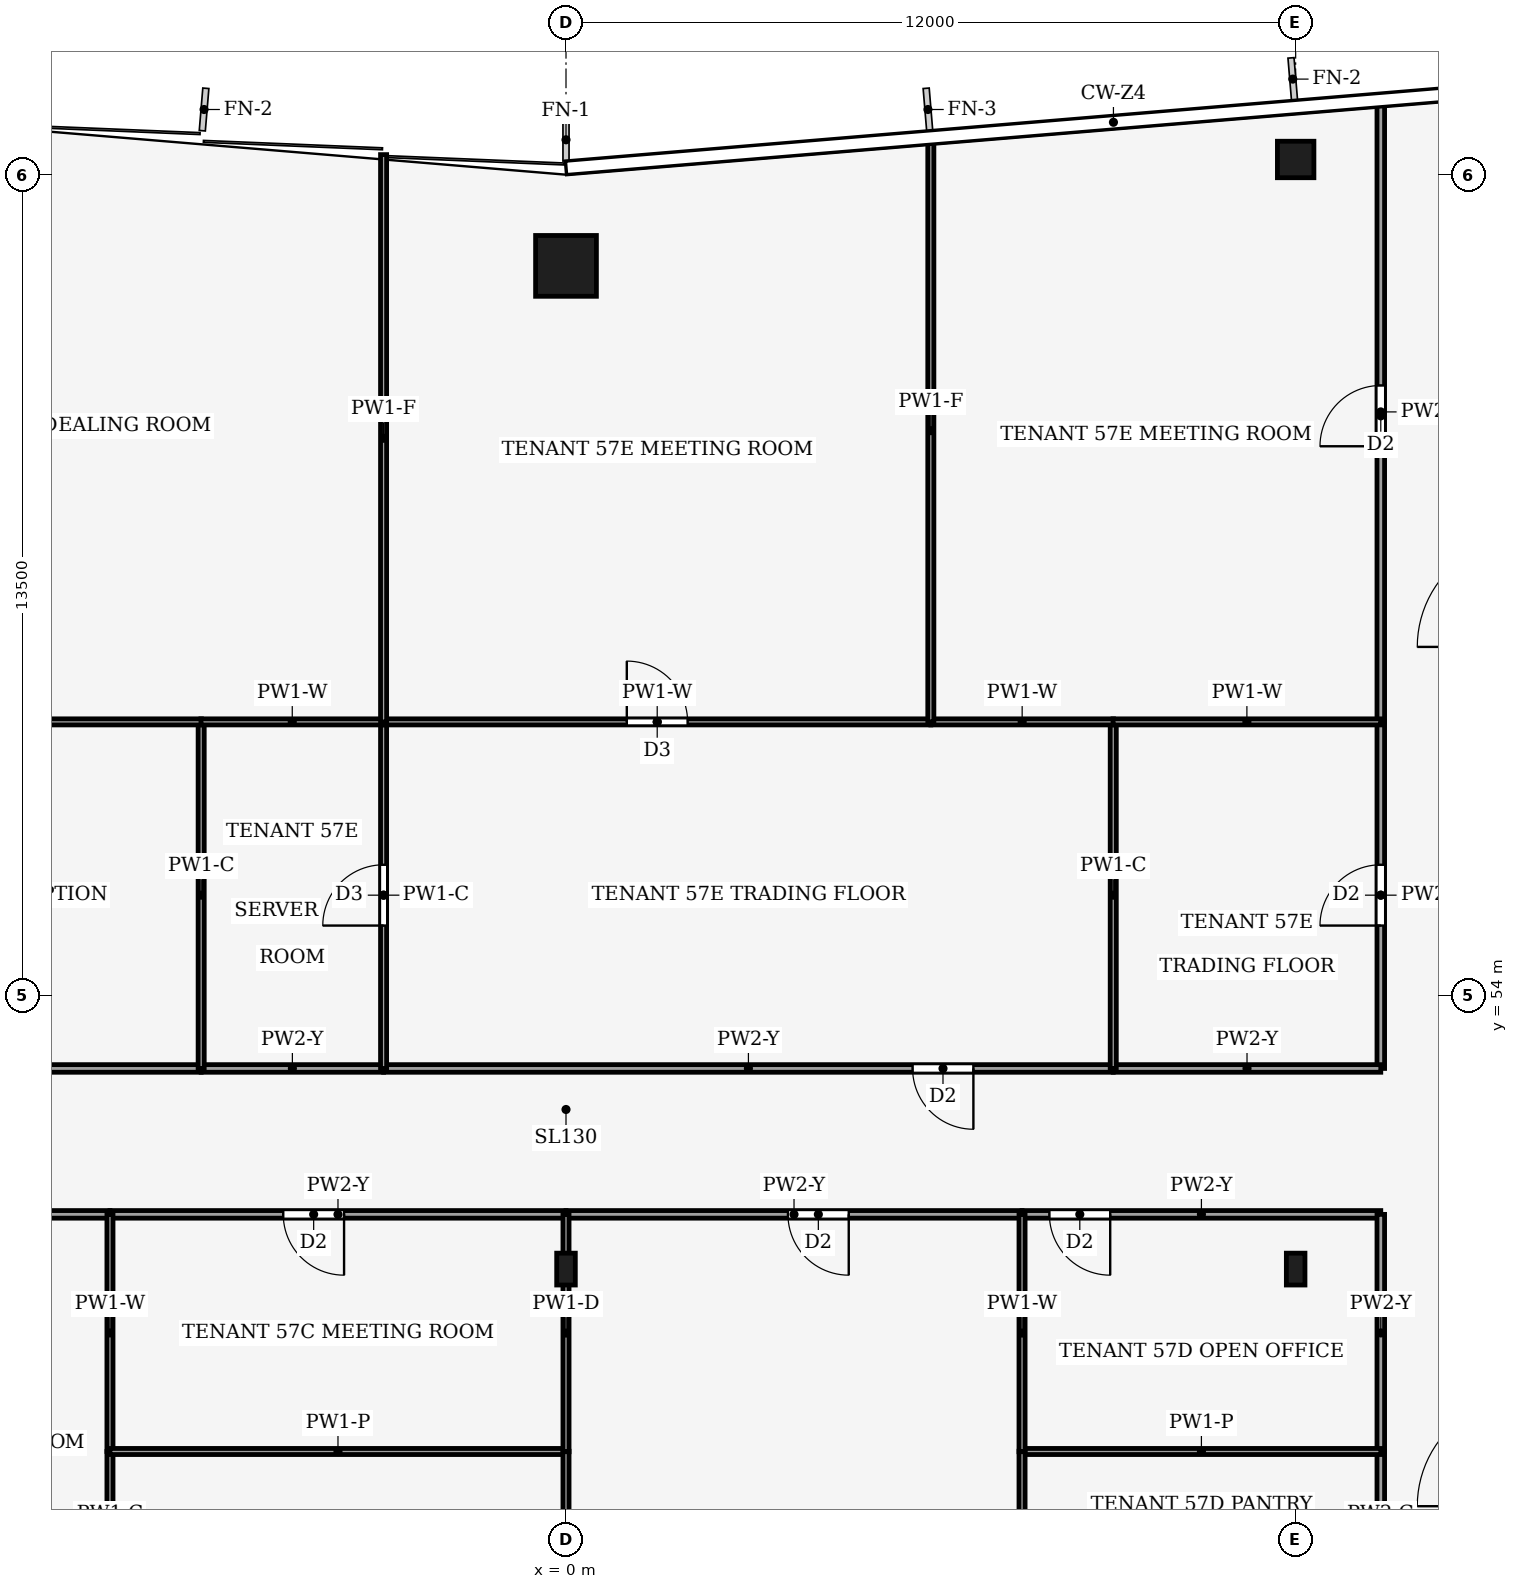
"""IFC4 building model, lengths in metres.
Left out: names, types, materials, properties, quantities, classifications, styles, units other than length and angle.
Written with IfcOpenShell. Run it as: python <this file> out.ifc"""

import sys

from ifc_helpers import new_model, si_unit, direction, frame, frame_2d, origin, origin_2d, place, context, subcontext, project, spatial, rectangle, hollow_rectangle, i_section, extrude, element, fill, save


model = new_model("IFC4")
c1 = context("Model", 3, precision=1e-05, world=origin(), true_north=direction((0.0, 1.0)))
c2 = subcontext(c1, "Body", "Model", "MODEL_VIEW")
j1 = project(units=[si_unit("LENGTHUNIT", "METRE"), si_unit("PLANEANGLEUNIT", "RADIAN")], contexts=[c1])
p1 = place(None, origin())
s1 = spatial("IfcSite", under=j1, at=p1, CompositionType="ELEMENT")
p2 = place(p1, origin())
s2 = spatial("IfcBuilding", under=s1, at=p2, CompositionType="ELEMENT")
p3 = place(p2, frame((0.0, 0.0, 250.0)))
s3 = spatial("IfcBuildingStorey", under=s2, at=p3, CompositionType="ELEMENT", Elevation=250.0)
p4 = place(p3, frame((0.0, 66.0, 0.0), z_axis=(0.0, 0.0, 1.0), x_axis=(1.0, 0.0, 0.0)))
e1 = element("IfcColumn", 1, at=p4, inside=s3, PredefinedType="COLUMN", context=c2, shape_type="SweptSolid", body=[
    extrude(hollow_rectangle(XDim=1.0, YDim=1.0, WallThickness=0.045, at=origin_2d()), origin(), (0.0, 0.0, 1.0), 4.0),
])
p5 = place(p3, frame((12.0, 67.75, 0.0), z_axis=(0.0, 0.0, 1.0), x_axis=(1.0, 0.0, 0.0)))
e2 = element("IfcColumn", 2, at=p5, inside=s3, PredefinedType="COLUMN", context=c2, shape_type="SweptSolid", body=[
    extrude(hollow_rectangle(XDim=0.6, YDim=0.6, WallThickness=0.025, at=origin_2d()), origin(), (0.0, 0.0, 1.0), 4.0),
])
for number, where, z_axis, x_axis in (
    (3, (0.0, 49.5, 0.0), (0.0, 0.0, 1.0), (1.0, 0.0, 0.0)),
    (4, (12.0, 49.5, 0.0), (0.0, 0.0, 1.0), (1.0, 0.0, 0.0)),
):
    element("IfcColumn", number, at=place(p3, frame(where, z_axis=z_axis, x_axis=x_axis)), inside=s3, PredefinedType="COLUMN", context=c2, shape_type="SweptSolid", body=[
        extrude(i_section(OverallWidth=0.306, OverallDepth=0.524, WebThickness=0.012, FlangeThickness=0.04, FilletRadius=0.027, at=origin_2d()), origin(), (0.0, 0.0, 1.0), 4.0),
    ])
p6 = place(p3, frame((-7.5, 50.4, 0.0), z_axis=(0.0, 0.0, 1.0), x_axis=(-1.0, 0.0, 0.0)))
e5 = element("IfcWall", 5, at=p6, inside=s3, PredefinedType="PARTITIONING", context=c2, shape_type="SweptSolid", body=[
    extrude(rectangle(XDim=5.9, YDim=0.125, at=frame_2d((2.95, 0.0))), origin(), (0.0, 0.0, 1.0), 3.24),
])
p7 = place(p3, frame((0.0, 50.4, 0.0), z_axis=(0.0, 0.0, 1.0), x_axis=(-1.0, 0.0, 0.0)))
e6 = element("IfcWall", 6, at=p7, inside=s3, PredefinedType="PARTITIONING", context=c2, shape_type="SweptSolid", body=[
    extrude(rectangle(XDim=7.5, YDim=0.125, at=frame_2d((3.75, 0.0))), origin(), (0.0, 0.0, 1.0), 3.24),
])
p8 = place(p7, frame((3.65, 0.0, 0.0)))
e7 = element("IfcOpeningElement", 7, at=p8, cuts=e6, PredefinedType="OPENING", context=c2, shape_type="SweptSolid", body=[
    extrude(rectangle(XDim=1.0, YDim=2.1, at=frame_2d((0.5, 1.05))), frame((0.0, 0.073, 0.0), z_axis=(0.0, -1.0, 0.0), x_axis=(1.0, 0.0, 0.0)), (0.0, 0.0, 1.0), 0.145),
])
p9 = place(p3, frame((13.4, 43.5, 0.0), z_axis=(0.0, 0.0, 1.0), x_axis=(0.0, 1.0, 0.0)))
e8 = element("IfcWall", 8, at=p9, inside=s3, PredefinedType="PARTITIONING", context=c2, shape_type="SweptSolid", body=[
    extrude(rectangle(XDim=3.0, YDim=0.125, at=frame_2d((1.5, 0.0))), origin(), (0.0, 0.0, 1.0), 3.87),
])
p10 = place(p3, frame((13.4, 50.4, 0.0), z_axis=(0.0, 0.0, 1.0), x_axis=(-1.0, 0.0, 0.0)))
e9 = element("IfcWall", 9, at=p10, inside=s3, PredefinedType="PARTITIONING", context=c2, shape_type="SweptSolid", body=[
    extrude(rectangle(XDim=5.9, YDim=0.125, at=frame_2d((2.95, 0.0))), origin(), (0.0, 0.0, 1.0), 3.24),
])
p11 = place(p10, frame((4.45, 0.0, 0.0)))
e10 = element("IfcOpeningElement", 10, at=p11, cuts=e9, PredefinedType="OPENING", context=c2, shape_type="SweptSolid", body=[
    extrude(rectangle(XDim=1.0, YDim=2.1, at=frame_2d((0.5, 1.05))), frame((0.0, 0.073, 0.0), z_axis=(0.0, -1.0, 0.0), x_axis=(1.0, 0.0, 0.0)), (0.0, 0.0, 1.0), 0.145),
])
p12 = place(p3, frame((13.4, 46.5, 0.0), z_axis=(0.0, 0.0, 1.0), x_axis=(0.0, 1.0, 0.0)))
e11 = element("IfcWall", 11, at=p12, inside=s3, PredefinedType="PARTITIONING", context=c2, shape_type="SweptSolid", body=[
    extrude(rectangle(XDim=3.9, YDim=0.125, at=frame_2d((1.95, 0.0))), origin(), (0.0, 0.0, 1.0), 3.24),
])
p13 = place(p3, frame((7.5, 50.4, 0.0), z_axis=(0.0, 0.0, 1.0), x_axis=(-1.0, 0.0, 0.0)))
e12 = element("IfcWall", 12, at=p13, inside=s3, PredefinedType="PARTITIONING", context=c2, shape_type="SweptSolid", body=[
    extrude(rectangle(XDim=7.5, YDim=0.125, at=frame_2d((3.75, 0.0))), origin(), (0.0, 0.0, 1.0), 3.24),
])
p14 = place(p13, frame((2.85, 0.0, 0.0)))
e13 = element("IfcOpeningElement", 13, at=p14, cuts=e12, PredefinedType="OPENING", context=c2, shape_type="SweptSolid", body=[
    extrude(rectangle(XDim=1.0, YDim=2.1, at=frame_2d((0.5, 1.05))), frame((0.0, 0.073, 0.0), z_axis=(0.0, -1.0, 0.0), x_axis=(1.0, 0.0, 0.0)), (0.0, 0.0, 1.0), 0.145),
])
p15 = place(p3, frame((-13.4, 52.8, 0.0), z_axis=(0.0, 0.0, 1.0), x_axis=(1.0, 0.0, 0.0)))
e14 = element("IfcWall", 14, at=p15, inside=s3, PredefinedType="PARTITIONING", context=c2, shape_type="SweptSolid", body=[
    extrude(rectangle(XDim=7.4, YDim=0.125, at=frame_2d((3.7, 0.0))), origin(), (0.0, 0.0, 1.0), 3.24),
])
p16 = place(p15, frame((3.2, 0.0, 0.0)))
e15 = element("IfcOpeningElement", 15, at=p16, cuts=e14, PredefinedType="OPENING", context=c2, shape_type="SweptSolid", body=[
    extrude(rectangle(XDim=1.0, YDim=2.1, at=frame_2d((0.5, 1.05))), frame((0.0, 0.073, 0.0), z_axis=(0.0, -1.0, 0.0), x_axis=(1.0, 0.0, 0.0)), (0.0, 0.0, 1.0), 0.145),
])
p17 = place(p3, frame((-3.0, 52.8, 0.0), z_axis=(0.0, 0.0, 1.0), x_axis=(-1.0, 0.0, 0.0)))
e16 = element("IfcWall", 16, at=p17, inside=s3, PredefinedType="PARTITIONING", context=c2, shape_type="SweptSolid", body=[
    extrude(rectangle(XDim=3.0, YDim=0.125, at=frame_2d((1.5, 0.0))), origin(), (0.0, 0.0, 1.0), 3.24),
])
p18 = place(p3, frame((9.0, 52.8, 0.0), z_axis=(0.0, 0.0, 1.0), x_axis=(-1.0, 0.0, 0.0)))
e17 = element("IfcWall", 17, at=p18, inside=s3, PredefinedType="PARTITIONING", context=c2, shape_type="SweptSolid", body=[
    extrude(rectangle(XDim=12.0, YDim=0.125, at=frame_2d((6.0, 0.0))), origin(), (0.0, 0.0, 1.0), 3.24),
])
p19 = place(p18, frame((2.3, 0.0, 0.0)))
e18 = element("IfcOpeningElement", 18, at=p19, cuts=e17, PredefinedType="OPENING", context=c2, shape_type="SweptSolid", body=[
    extrude(rectangle(XDim=1.0, YDim=2.1, at=frame_2d((0.5, 1.05))), frame((0.0, 0.073, 0.0), z_axis=(0.0, -1.0, 0.0), x_axis=(1.0, 0.0, 0.0)), (0.0, 0.0, 1.0), 0.145),
])
p20 = place(p3, frame((13.4, 52.8, 0.0), z_axis=(0.0, 0.0, 1.0), x_axis=(0.0, 1.0, 0.0)))
e19 = element("IfcWall", 19, at=p20, inside=s3, PredefinedType="PARTITIONING", context=c2, shape_type="SweptSolid", body=[
    extrude(rectangle(XDim=5.7, YDim=0.125, at=frame_2d((2.85, 0.0))), origin(), (0.0, 0.0, 1.0), 3.87),
])
p21 = place(p20, frame((2.35, 0.0, 0.0)))
e20 = element("IfcOpeningElement", 20, at=p21, cuts=e19, PredefinedType="OPENING", context=c2, shape_type="SweptSolid", body=[
    extrude(rectangle(XDim=1.0, YDim=2.1, at=frame_2d((0.5, 1.05))), frame((0.0, 0.073, 0.0), z_axis=(0.0, -1.0, 0.0), x_axis=(1.0, 0.0, 0.0)), (0.0, 0.0, 1.0), 0.145),
])
p22 = place(p3, frame((13.4, 52.8, 0.0), z_axis=(0.0, 0.0, 1.0), x_axis=(-1.0, 0.0, 0.0)))
e21 = element("IfcWall", 21, at=p22, inside=s3, PredefinedType="PARTITIONING", context=c2, shape_type="SweptSolid", body=[
    extrude(rectangle(XDim=4.4, YDim=0.125, at=frame_2d((2.2, 0.0))), origin(), (0.0, 0.0, 1.0), 3.24),
])
p23 = place(p3, frame((13.4, 58.5, 0.0), z_axis=(0.0, 0.0, 1.0), x_axis=(0.0, 1.0, 0.0)))
e22 = element("IfcWall", 22, at=p23, inside=s3, PredefinedType="PARTITIONING", context=c2, shape_type="SweptSolid", body=[
    extrude(rectangle(XDim=10.197, YDim=0.125, at=frame_2d((5.098, 0.0))), origin(), (0.0, 0.0, 1.0), 3.04),
])
p24 = place(p23, frame((4.533, 0.0, 0.0)))
e23 = element("IfcOpeningElement", 23, at=p24, cuts=e22, PredefinedType="OPENING", context=c2, shape_type="SweptSolid", body=[
    extrude(rectangle(XDim=1.0, YDim=2.1, at=frame_2d((0.5, 1.05))), frame((0.0, 0.073, 0.0), z_axis=(0.0, -1.0, 0.0), x_axis=(1.0, 0.0, 0.0)), (0.0, 0.0, 1.0), 0.145),
])
p25 = place(p3, frame((-7.5, 43.496, 0.0), z_axis=(0.0, 0.0, 1.0), x_axis=(0.0, 1.0, 0.0)))
e24 = element("IfcWall", 24, at=p25, inside=s3, PredefinedType="PARTITIONING", context=c2, shape_type="SweptSolid", body=[
    extrude(rectangle(XDim=3.004, YDim=0.1, at=frame_2d((1.502, 0.0))), origin(), (0.0, 0.0, 1.0), 3.87),
])
p26 = place(p3, frame((-7.5, 46.5, 0.0), z_axis=(0.0, 0.0, 1.0), x_axis=(0.0, 1.0, 0.0)))
e25 = element("IfcWall", 25, at=p26, inside=s3, PredefinedType="PARTITIONING", context=c2, shape_type="SweptSolid", body=[
    extrude(rectangle(XDim=3.9, YDim=0.1, at=frame_2d((1.95, 0.0))), origin(), (0.0, 0.0, 1.0), 3.24),
])
p27 = place(p3, frame((0.0, 46.5, 0.0), z_axis=(0.0, 0.0, 1.0), x_axis=(-1.0, 0.0, 0.0)))
e26 = element("IfcWall", 26, at=p27, inside=s3, PredefinedType="PARTITIONING", context=c2, shape_type="SweptSolid", body=[
    extrude(rectangle(XDim=7.5, YDim=0.1, at=frame_2d((3.75, 0.0))), origin(), (0.0, 0.0, 1.0), 3.44),
])
p28 = place(p3, frame((0.0, 38.4, 0.0), z_axis=(0.0, 0.0, 1.0), x_axis=(0.0, 1.0, 0.0)))
e27 = element("IfcWall", 27, at=p28, inside=s3, PredefinedType="PARTITIONING", context=c2, shape_type="SweptSolid", body=[
    extrude(rectangle(XDim=8.104, YDim=0.1, at=frame_2d((4.052, 0.0))), origin(), (0.0, 0.0, 1.0), 3.44),
])
p29 = place(p3, frame((0.0, 46.496, 0.0), z_axis=(0.0, 0.0, 1.0), x_axis=(0.0, 1.0, 0.0)))
e28 = element("IfcWall", 28, at=p29, inside=s3, PredefinedType="PARTITIONING", context=c2, shape_type="SweptSolid", body=[
    extrude(rectangle(XDim=3.904, YDim=0.1, at=frame_2d((1.952, 0.0))), origin(), (0.0, 0.0, 1.0), 3.29),
])
p30 = place(p3, frame((13.4, 46.5, 0.0), z_axis=(0.0, 0.0, 1.0), x_axis=(-1.0, 0.0, 0.0)))
e29 = element("IfcWall", 29, at=p30, inside=s3, PredefinedType="PARTITIONING", context=c2, shape_type="SweptSolid", body=[
    extrude(rectangle(XDim=5.9, YDim=0.1, at=frame_2d((2.95, 0.0))), origin(), (0.0, 0.0, 1.0), 3.44),
])
p31 = place(p3, frame((7.5, 46.504, 0.0), z_axis=(0.0, 0.0, 1.0), x_axis=(0.0, -1.0, 0.0)))
e30 = element("IfcWall", 30, at=p31, inside=s3, PredefinedType="PARTITIONING", context=c2, shape_type="SweptSolid", body=[
    extrude(rectangle(XDim=3.008, YDim=0.1, at=frame_2d((1.504, 0.0))), origin(), (0.0, 0.0, 1.0), 3.87),
])
p32 = place(p31, frame((1.004, 0.0, 0.0)))
e31 = element("IfcOpeningElement", 31, at=p32, cuts=e30, PredefinedType="OPENING", context=c2, shape_type="SweptSolid", body=[
    extrude(rectangle(XDim=1.0, YDim=2.1, at=frame_2d((0.5, 1.05))), frame((0.0, 0.06, 0.0), z_axis=(0.0, -1.0, 0.0), x_axis=(1.0, 0.0, 0.0)), (0.0, 0.0, 1.0), 0.12),
])
p33 = place(p3, frame((7.5, 50.4, 0.0), z_axis=(0.0, 0.0, 1.0), x_axis=(0.0, -1.0, 0.0)))
e32 = element("IfcWall", 32, at=p33, inside=s3, PredefinedType="PARTITIONING", context=c2, shape_type="SweptSolid", body=[
    extrude(rectangle(XDim=3.904, YDim=0.1, at=frame_2d((1.952, 0.0))), origin(), (0.0, 0.0, 1.0), 3.24),
])
p34 = place(p3, frame((-6.0, 52.8, 0.0), z_axis=(0.0, 0.0, 1.0), x_axis=(0.0, 1.0, 0.0)))
e33 = element("IfcWall", 33, at=p34, inside=s3, PredefinedType="PARTITIONING", context=c2, shape_type="SweptSolid", body=[
    extrude(rectangle(XDim=5.7, YDim=0.1, at=frame_2d((2.85, 0.0))), origin(), (0.0, 0.0, 1.0), 3.87),
])
p35 = place(p3, frame((-5.996, 58.5, 0.0), z_axis=(0.0, 0.0, 1.0), x_axis=(-1.0, 0.0, 0.0)))
e34 = element("IfcWall", 34, at=p35, inside=s3, PredefinedType="PARTITIONING", context=c2, shape_type="SweptSolid", body=[
    extrude(rectangle(XDim=7.404, YDim=0.1, at=frame_2d((3.702, 0.0))), origin(), (0.0, 0.0, 1.0), 3.24),
])
p36 = place(p3, frame((-3.0, 52.8, 0.0), z_axis=(0.0, 0.0, 1.0), x_axis=(0.0, 1.0, 0.0)))
e35 = element("IfcWall", 35, at=p36, inside=s3, PredefinedType="PARTITIONING", context=c2, shape_type="SweptSolid", body=[
    extrude(rectangle(XDim=5.7, YDim=0.1, at=frame_2d((2.85, 0.0))), origin(), (0.0, 0.0, 1.0), 3.87),
])
p37 = place(p36, frame((2.35, 0.0, 0.0)))
e36 = element("IfcOpeningElement", 36, at=p37, cuts=e35, PredefinedType="OPENING", context=c2, shape_type="SweptSolid", body=[
    extrude(rectangle(XDim=1.0, YDim=2.1, at=frame_2d((0.5, 1.05))), frame((0.0, 0.06, 0.0), z_axis=(0.0, -1.0, 0.0), x_axis=(1.0, 0.0, 0.0)), (0.0, 0.0, 1.0), 0.12),
])
p38 = place(p3, frame((-3.0, 58.5, 0.0), z_axis=(0.0, 0.0, 1.0), x_axis=(-1.0, 0.0, 0.0)))
e37 = element("IfcWall", 37, at=p38, inside=s3, PredefinedType="PARTITIONING", context=c2, shape_type="SweptSolid", body=[
    extrude(rectangle(XDim=3.004, YDim=0.1, at=frame_2d((1.502, 0.0))), origin(), (0.0, 0.0, 1.0), 3.24),
])
p39 = place(p3, frame((9.0, 52.8, 0.0), z_axis=(0.0, 0.0, 1.0), x_axis=(0.0, 1.0, 0.0)))
e38 = element("IfcWall", 38, at=p39, inside=s3, PredefinedType="PARTITIONING", context=c2, shape_type="SweptSolid", body=[
    extrude(rectangle(XDim=5.7, YDim=0.1, at=frame_2d((2.85, 0.0))), origin(), (0.0, 0.0, 1.0), 3.87),
])
p40 = place(p3, frame((-3.0, 58.5, 0.0), z_axis=(0.0, 0.0, 1.0), x_axis=(1.0, 0.0, 0.0)))
e39 = element("IfcWall", 39, at=p40, inside=s3, PredefinedType="PARTITIONING", context=c2, shape_type="SweptSolid", body=[
    extrude(rectangle(XDim=9.0, YDim=0.1, at=frame_2d((4.5, 0.0))), origin(), (0.0, 0.0, 1.0), 3.24),
])
p41 = place(p40, frame((4.0, 0.0, 0.0)))
e40 = element("IfcOpeningElement", 40, at=p41, cuts=e39, PredefinedType="OPENING", context=c2, shape_type="SweptSolid", body=[
    extrude(rectangle(XDim=1.0, YDim=2.1, at=frame_2d((0.5, 1.05))), frame((0.0, 0.06, 0.0), z_axis=(0.0, -1.0, 0.0), x_axis=(1.0, 0.0, 0.0)), (0.0, 0.0, 1.0), 0.12),
])
p42 = place(p3, frame((9.004, 58.5, 0.0), z_axis=(0.0, 0.0, 1.0), x_axis=(-1.0, 0.0, 0.0)))
e41 = element("IfcWall", 41, at=p42, inside=s3, PredefinedType="PARTITIONING", context=c2, shape_type="SweptSolid", body=[
    extrude(rectangle(XDim=3.004, YDim=0.1, at=frame_2d((1.502, 0.0))), origin(), (0.0, 0.0, 1.0), 3.24),
])
p43 = place(p3, frame((13.4, 58.5, 0.0), z_axis=(0.0, 0.0, 1.0), x_axis=(-1.0, 0.0, 0.0)))
e42 = element("IfcWall", 42, at=p43, inside=s3, PredefinedType="PARTITIONING", context=c2, shape_type="SweptSolid", body=[
    extrude(rectangle(XDim=4.404, YDim=0.1, at=frame_2d((2.202, 0.0))), origin(), (0.0, 0.0, 1.0), 3.24),
])
p44 = place(p3, frame((-3.0, 58.5, 0.0), z_axis=(0.0, 0.0, 1.0), x_axis=(0.0, 1.0, 0.0)))
e43 = element("IfcWall", 43, at=p44, inside=s3, PredefinedType="PARTITIONING", context=c2, shape_type="SweptSolid", body=[
    extrude(rectangle(XDim=9.33, YDim=0.1, at=frame_2d((4.665, 0.0))), origin(), (0.0, 0.0, 1.0), 3.04),
])
p45 = place(p3, frame((6.0, 58.5, 0.0), z_axis=(0.0, 0.0, 1.0), x_axis=(0.0, 1.0, 0.0)))
e44 = element("IfcWall", 44, at=p45, inside=s3, PredefinedType="PARTITIONING", context=c2, shape_type="SweptSolid", body=[
    extrude(rectangle(XDim=9.58, YDim=0.1, at=frame_2d((4.79, 0.0))), origin(), (0.0, 0.0, 1.0), 3.04),
])
p46 = place(p8, origin())
e45 = element("IfcDoor", 45, at=p46, inside=s3, OperationType="SINGLE_SWING_RIGHT", PredefinedType="DOOR", context=c2, shape_type="SweptSolid", body=[
    extrude(rectangle(XDim=1.0, YDim=2.1, at=frame_2d((0.5, 1.05))), frame((0.0, 0.025, 0.0), z_axis=(0.0, -1.0, 0.0), x_axis=(1.0, 0.0, 0.0)), (0.0, 0.0, 1.0), 0.05),
])
fill(e7, e45)
p47 = place(p11, origin())
e46 = element("IfcDoor", 46, at=p47, inside=s3, OperationType="SINGLE_SWING_RIGHT", PredefinedType="DOOR", context=c2, shape_type="SweptSolid", body=[
    extrude(rectangle(XDim=1.0, YDim=2.1, at=frame_2d((0.5, 1.05))), frame((0.0, 0.025, 0.0), z_axis=(0.0, -1.0, 0.0), x_axis=(1.0, 0.0, 0.0)), (0.0, 0.0, 1.0), 0.05),
])
fill(e10, e46)
p48 = place(p14, origin())
e47 = element("IfcDoor", 47, at=p48, inside=s3, OperationType="SINGLE_SWING_LEFT", PredefinedType="DOOR", context=c2, shape_type="SweptSolid", body=[
    extrude(rectangle(XDim=1.0, YDim=2.1, at=frame_2d((0.5, 1.05))), frame((0.0, 0.025, 0.0), z_axis=(0.0, -1.0, 0.0), x_axis=(1.0, 0.0, 0.0)), (0.0, 0.0, 1.0), 0.05),
])
fill(e13, e47)
p49 = place(p19, origin())
e48 = element("IfcDoor", 48, at=p49, inside=s3, OperationType="SINGLE_SWING_LEFT", PredefinedType="DOOR", context=c2, shape_type="SweptSolid", body=[
    extrude(rectangle(XDim=1.0, YDim=2.1, at=frame_2d((0.5, 1.05))), frame((0.0, 0.025, 0.0), z_axis=(0.0, -1.0, 0.0), x_axis=(1.0, 0.0, 0.0)), (0.0, 0.0, 1.0), 0.05),
])
fill(e18, e48)
p50 = place(p21, origin())
e49 = element("IfcDoor", 49, at=p50, inside=s3, OperationType="SINGLE_SWING_RIGHT", PredefinedType="DOOR", context=c2, shape_type="SweptSolid", body=[
    extrude(rectangle(XDim=1.0, YDim=2.1, at=frame_2d((0.5, 1.05))), frame((0.0, 0.025, 0.0), z_axis=(0.0, -1.0, 0.0), x_axis=(1.0, 0.0, 0.0)), (0.0, 0.0, 1.0), 0.05),
])
fill(e20, e49)
p51 = place(p24, origin())
e50 = element("IfcDoor", 50, at=p51, inside=s3, OperationType="SINGLE_SWING_LEFT", PredefinedType="DOOR", context=c2, shape_type="SweptSolid", body=[
    extrude(rectangle(XDim=1.0, YDim=2.1, at=frame_2d((0.5, 1.05))), frame((0.0, 0.025, 0.0), z_axis=(0.0, -1.0, 0.0), x_axis=(1.0, 0.0, 0.0)), (0.0, 0.0, 1.0), 0.05),
])
fill(e23, e50)
p52 = place(p37, origin())
e51 = element("IfcDoor", 51, at=p52, inside=s3, OperationType="SINGLE_SWING_RIGHT", PredefinedType="DOOR", context=c2, shape_type="SweptSolid", body=[
    extrude(rectangle(XDim=1.0, YDim=2.1, at=frame_2d((0.5, 1.05))), frame((0.0, 0.025, 0.0), z_axis=(0.0, -1.0, 0.0), x_axis=(1.0, 0.0, 0.0)), (0.0, 0.0, 1.0), 0.05),
])
fill(e36, e51)
p53 = place(p41, origin())
e52 = element("IfcDoor", 52, at=p53, inside=s3, OperationType="SINGLE_SWING_LEFT", PredefinedType="DOOR", context=c2, shape_type="SweptSolid", body=[
    extrude(rectangle(XDim=1.0, YDim=2.1, at=frame_2d((0.5, 1.05))), frame((0.0, 0.025, 0.0), z_axis=(0.0, -1.0, 0.0), x_axis=(1.0, 0.0, 0.0)), (0.0, 0.0, 1.0), 0.05),
])
fill(e40, e52)
save(model, sys.argv[1])
